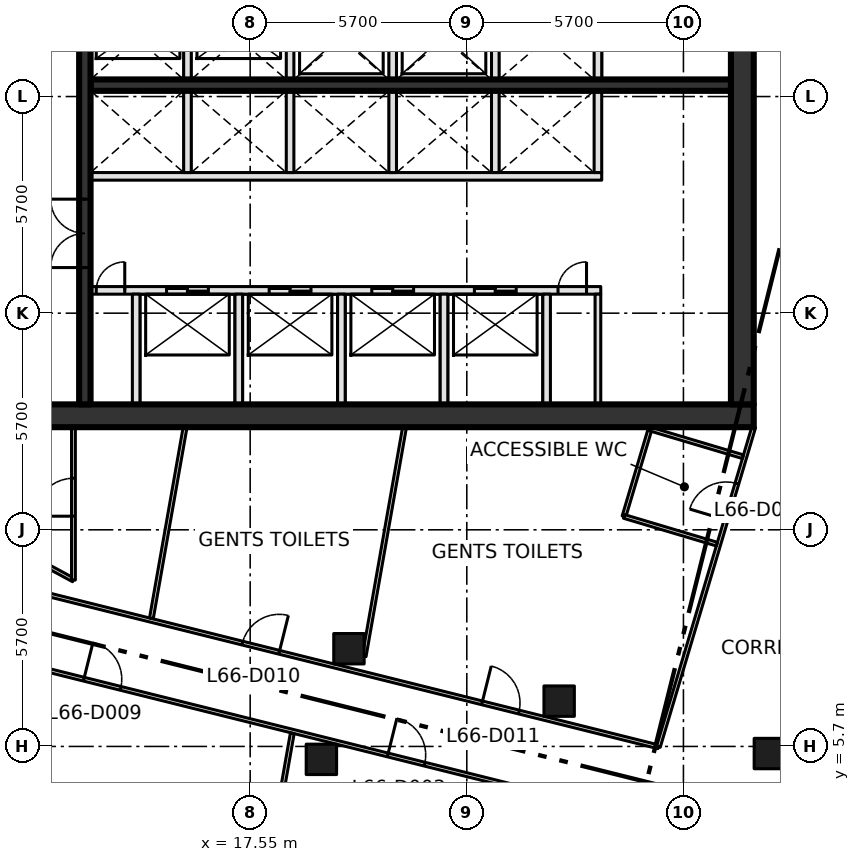
"""IFC4 building model, lengths in metres.
Left out: names, types, materials, properties, quantities, classifications, styles, units other than length and angle.
Written with IfcOpenShell. Run it as: python <this file> out.ifc"""

import sys

from ifc_helpers import new_model, si_unit, direction, frame, frame_2d, origin, origin_2d, place, context, subcontext, project, spatial, rectangle, extrude, element, fill, save


model = new_model("IFC4")
c1 = context("Model", 3, precision=1e-05, world=origin(), true_north=direction((0.0, 1.0)))
c2 = subcontext(c1, "Body", "Model", "MODEL_VIEW")
j1 = project(units=[si_unit("LENGTHUNIT", "METRE"), si_unit("PLANEANGLEUNIT", "RADIAN")], contexts=[c1])
p1 = place(None, origin())
s1 = spatial("IfcSite", under=j1, at=p1, CompositionType="ELEMENT")
p2 = place(p1, origin())
s2 = spatial("IfcBuilding", under=s1, at=p2, CompositionType="ELEMENT")
p3 = place(p2, frame((0.0, 0.0, 289.8)))
s3 = spatial("IfcBuildingStorey", under=s2, at=p3, CompositionType="ELEMENT", Elevation=289.8)
for number, where, z_axis, x_axis in (
    (1, (19.424, 5.36, 0.0), (0.0, 0.0, 1.0), (1.0, 0.0, 0.0)),
    (2, (20.149, 8.271, 0.0), (0.0, 0.0, 1.0), (1.0, 0.0, 0.0)),
    (3, (25.68, 6.892, 0.0), (0.0, 0.0, 1.0), (1.0, 0.0, 0.0)),
    (4, (31.211, 5.513, 0.0), (0.0, 0.0, 1.0), (1.0, 0.0, 0.0)),
):
    element("IfcColumn", number, at=place(p3, frame(where, z_axis=z_axis, x_axis=x_axis)), inside=s3, PredefinedType="COLUMN", context=c2, shape_type="SweptSolid", body=[
        extrude(rectangle(XDim=0.8, YDim=0.8, at=origin_2d()), origin(), (0.0, 0.0, 1.0), 4.2),
    ])
p4 = place(p3, frame((8.0, 14.4, -0.3), z_axis=(0.0, 0.0, 1.0), x_axis=(1.0, 0.0, 0.0)))
e5 = element("IfcWall", 5, at=p4, inside=s3, PredefinedType="SHEAR", context=c2, shape_type="SweptSolid", body=[
    extrude(rectangle(XDim=22.8, YDim=0.6, at=frame_2d((11.4, 0.0))), origin(), (0.0, 0.0, 1.0), 4.2),
])
p5 = place(p4, frame((2.3, 0.0, 0.3)))
e6 = element("IfcOpeningElement", 6, at=p5, cuts=e5, PredefinedType="OPENING", context=c2, shape_type="SweptSolid", body=[
    extrude(rectangle(XDim=1.8, YDim=2.1, at=frame_2d((0.9, 1.05))), frame((0.0, 0.31, 0.0), z_axis=(0.0, -1.0, 0.0), x_axis=(1.0, 0.0, 0.0)), (0.0, 0.0, 1.0), 0.62),
])
p6 = place(p3, frame((30.5, 14.7, -0.3), z_axis=(0.0, 0.0, 1.0), x_axis=(0.0, 1.0, 0.0)))
e7 = element("IfcWall", 7, at=p6, inside=s3, PredefinedType="SHEAR", context=c2, shape_type="SweptSolid", body=[
    extrude(rectangle(XDim=21.0, YDim=0.6, at=frame_2d((10.5, 0.0))), origin(), (0.0, 0.0, 1.0), 4.2),
])
p7 = place(p3, frame((13.35, 17.7, 0.0), z_axis=(0.0, 0.0, 1.0), x_axis=(1.0, 0.0, 0.0)))
e8 = element("IfcWall", 8, at=p7, inside=s3, PredefinedType="SOLIDWALL", context=c2, shape_type="SweptSolid", body=[
    extrude(rectangle(XDim=13.425, YDim=0.2, at=frame_2d((6.712, 0.0))), origin(), (0.0, 0.0, 1.0), 3.9),
])
p8 = place(p7, frame((2.0, 0.0, 0.0)))
e9 = element("IfcOpeningElement", 9, at=p8, cuts=e8, PredefinedType="OPENING", context=c2, shape_type="SweptSolid", body=[
    extrude(rectangle(XDim=1.1, YDim=2.1, at=frame_2d((0.55, 1.05))), frame((0.0, 0.11, 0.0), z_axis=(0.0, -1.0, 0.0), x_axis=(1.0, 0.0, 0.0)), (0.0, 0.0, 1.0), 0.22),
])
p9 = place(p7, frame((4.7, 0.0, 0.0)))
e10 = element("IfcOpeningElement", 10, at=p9, cuts=e8, PredefinedType="OPENING", context=c2, shape_type="SweptSolid", body=[
    extrude(rectangle(XDim=1.1, YDim=2.1, at=frame_2d((0.55, 1.05))), frame((0.0, 0.11, 0.0), z_axis=(0.0, -1.0, 0.0), x_axis=(1.0, 0.0, 0.0)), (0.0, 0.0, 1.0), 0.22),
])
p10 = place(p7, frame((7.4, 0.0, 0.0)))
e11 = element("IfcOpeningElement", 11, at=p10, cuts=e8, PredefinedType="OPENING", context=c2, shape_type="SweptSolid", body=[
    extrude(rectangle(XDim=1.1, YDim=2.1, at=frame_2d((0.55, 1.05))), frame((0.0, 0.11, 0.0), z_axis=(0.0, -1.0, 0.0), x_axis=(1.0, 0.0, 0.0)), (0.0, 0.0, 1.0), 0.22),
])
p11 = place(p7, frame((10.1, 0.0, 0.0)))
e12 = element("IfcOpeningElement", 12, at=p11, cuts=e8, PredefinedType="OPENING", context=c2, shape_type="SweptSolid", body=[
    extrude(rectangle(XDim=1.1, YDim=2.1, at=frame_2d((0.55, 1.05))), frame((0.0, 0.11, 0.0), z_axis=(0.0, -1.0, 0.0), x_axis=(1.0, 0.0, 0.0)), (0.0, 0.0, 1.0), 0.22),
])
p12 = place(p7, frame((0.15, 0.0, 0.0)))
e13 = element("IfcOpeningElement", 13, at=p12, cuts=e8, PredefinedType="OPENING", context=c2, shape_type="SweptSolid", body=[
    extrude(rectangle(XDim=0.75, YDim=2.1, at=frame_2d((0.375, 1.05))), frame((0.0, 0.11, 0.0), z_axis=(0.0, -1.0, 0.0), x_axis=(1.0, 0.0, 0.0)), (0.0, 0.0, 1.0), 0.22),
])
p13 = place(p7, frame((12.3, 0.0, 0.0)))
e14 = element("IfcOpeningElement", 14, at=p13, cuts=e8, PredefinedType="OPENING", context=c2, shape_type="SweptSolid", body=[
    extrude(rectangle(XDim=0.75, YDim=2.1, at=frame_2d((0.375, 1.05))), frame((0.0, 0.11, 0.0), z_axis=(0.0, -1.0, 0.0), x_axis=(1.0, 0.0, 0.0)), (0.0, 0.0, 1.0), 0.22),
])
p14 = place(p3, frame((13.35, 20.7, 0.0), z_axis=(0.0, 0.0, 1.0), x_axis=(1.0, 0.0, 0.0)))
e15 = element("IfcWall", 15, at=p14, inside=s3, PredefinedType="SOLIDWALL", context=c2, shape_type="SweptSolid", body=[
    extrude(rectangle(XDim=13.45, YDim=0.2, at=frame_2d((6.725, 0.0))), origin(), (0.0, 0.0, 1.0), 3.9),
])
p15 = place(p3, frame((13.35, 23.1, 0.0), z_axis=(0.0, 0.0, 1.0), x_axis=(1.0, 0.0, 0.0)))
e16 = element("IfcWall", 16, at=p15, inside=s3, PredefinedType="SHEAR", context=c2, shape_type="SweptSolid", body=[
    extrude(rectangle(XDim=16.85, YDim=0.3, at=frame_2d((8.425, 0.0))), origin(), (0.0, 0.0, 1.0), 3.9),
])
p16 = place(p3, frame((13.2, 14.7, 0.0), z_axis=(0.0, 0.0, 1.0), x_axis=(0.0, 1.0, 0.0)))
e17 = element("IfcWall", 17, at=p16, inside=s3, PredefinedType="SHEAR", context=c2, shape_type="SweptSolid", body=[
    extrude(rectangle(XDim=21.0, YDim=0.3, at=frame_2d((10.5, 0.0))), origin(), (0.0, 0.0, 1.0), 3.9),
])
p17 = place(p16, frame((3.6, 0.0, 0.0)))
e18 = element("IfcOpeningElement", 18, at=p17, cuts=e17, PredefinedType="OPENING", context=c2, shape_type="SweptSolid", body=[
    extrude(rectangle(XDim=1.8, YDim=2.1, at=frame_2d((0.9, 1.05))), frame((0.0, 0.16, 0.0), z_axis=(0.0, -1.0, 0.0), x_axis=(1.0, 0.0, 0.0)), (0.0, 0.0, 1.0), 0.32),
])
p18 = place(p16, frame((11.7, 0.0, 0.0)))
e19 = element("IfcOpeningElement", 19, at=p18, cuts=e17, PredefinedType="OPENING", context=c2, shape_type="SweptSolid", body=[
    extrude(rectangle(XDim=1.2, YDim=2.1, at=frame_2d((0.6, 1.05))), frame((0.0, 0.16, 0.0), z_axis=(0.0, -1.0, 0.0), x_axis=(1.0, 0.0, 0.0)), (0.0, 0.0, 1.0), 0.32),
])
p19 = place(p3, frame((14.55, 14.7, 0.0), z_axis=(0.0, 0.0, 1.0), x_axis=(0.0, 1.0, 0.0)))
e20 = element("IfcWall", 20, at=p19, inside=s3, PredefinedType="SOLIDWALL", context=c2, shape_type="SweptSolid", body=[
    extrude(rectangle(XDim=2.9, YDim=0.2, at=frame_2d((1.45, 0.0))), origin(), (0.0, 0.0, 1.0), 3.9),
])
p20 = place(p3, frame((15.9, 20.8, 0.0), z_axis=(0.0, 0.0, 1.0), x_axis=(0.0, 1.0, 0.0)))
e21 = element("IfcWall", 21, at=p20, inside=s3, PredefinedType="SOLIDWALL", context=c2, shape_type="SweptSolid", body=[
    extrude(rectangle(XDim=4.6, YDim=0.2, at=frame_2d((2.3, 0.0))), origin(), (0.0, 0.0, 1.0), 3.9),
])
p21 = place(p3, frame((17.25, 14.7, 0.0), z_axis=(0.0, 0.0, 1.0), x_axis=(0.0, 1.0, 0.0)))
e22 = element("IfcWall", 22, at=p21, inside=s3, PredefinedType="SOLIDWALL", context=c2, shape_type="SweptSolid", body=[
    extrude(rectangle(XDim=2.9, YDim=0.2, at=frame_2d((1.45, 0.0))), origin(), (0.0, 0.0, 1.0), 3.9),
])
p22 = place(p3, frame((18.6, 20.8, 0.0), z_axis=(0.0, 0.0, 1.0), x_axis=(0.0, 1.0, 0.0)))
e23 = element("IfcWall", 23, at=p22, inside=s3, PredefinedType="SOLIDWALL", context=c2, shape_type="SweptSolid", body=[
    extrude(rectangle(XDim=7.6, YDim=0.2, at=frame_2d((3.8, 0.0))), origin(), (0.0, 0.0, 1.0), 3.9),
])
p23 = place(p22, frame((5.6, 0.0, 0.0)))
e24 = element("IfcOpeningElement", 24, at=p23, cuts=e23, PredefinedType="OPENING", context=c2, shape_type="SweptSolid", body=[
    extrude(rectangle(XDim=1.2, YDim=2.1, at=frame_2d((0.6, 1.05))), frame((0.0, 0.11, 0.0), z_axis=(0.0, -1.0, 0.0), x_axis=(1.0, 0.0, 0.0)), (0.0, 0.0, 1.0), 0.22),
])
p24 = place(p3, frame((19.95, 14.7, 0.0), z_axis=(0.0, 0.0, 1.0), x_axis=(0.0, 1.0, 0.0)))
e25 = element("IfcWall", 25, at=p24, inside=s3, PredefinedType="SOLIDWALL", context=c2, shape_type="SweptSolid", body=[
    extrude(rectangle(XDim=2.9, YDim=0.2, at=frame_2d((1.45, 0.0))), origin(), (0.0, 0.0, 1.0), 3.9),
])
p25 = place(p3, frame((21.3, 20.8, 0.0), z_axis=(0.0, 0.0, 1.0), x_axis=(0.0, 1.0, 0.0)))
e26 = element("IfcWall", 26, at=p25, inside=s3, PredefinedType="SOLIDWALL", context=c2, shape_type="SweptSolid", body=[
    extrude(rectangle(XDim=4.6, YDim=0.2, at=frame_2d((2.3, 0.0))), origin(), (0.0, 0.0, 1.0), 3.9),
])
p26 = place(p3, frame((22.65, 14.7, 0.0), z_axis=(0.0, 0.0, 1.0), x_axis=(0.0, 1.0, 0.0)))
e27 = element("IfcWall", 27, at=p26, inside=s3, PredefinedType="SOLIDWALL", context=c2, shape_type="SweptSolid", body=[
    extrude(rectangle(XDim=2.9, YDim=0.2, at=frame_2d((1.45, 0.0))), origin(), (0.0, 0.0, 1.0), 3.9),
])
p27 = place(p3, frame((24.0, 20.8, 0.0), z_axis=(0.0, 0.0, 1.0), x_axis=(0.0, 1.0, 0.0)))
e28 = element("IfcWall", 28, at=p27, inside=s3, PredefinedType="SOLIDWALL", context=c2, shape_type="SweptSolid", body=[
    extrude(rectangle(XDim=4.6, YDim=0.2, at=frame_2d((2.3, 0.0))), origin(), (0.0, 0.0, 1.0), 3.9),
])
p28 = place(p3, frame((25.35, 14.7, 0.0), z_axis=(0.0, 0.0, 1.0), x_axis=(0.0, 1.0, 0.0)))
e29 = element("IfcWall", 29, at=p28, inside=s3, PredefinedType="SOLIDWALL", context=c2, shape_type="SweptSolid", body=[
    extrude(rectangle(XDim=2.9, YDim=0.2, at=frame_2d((1.45, 0.0))), origin(), (0.0, 0.0, 1.0), 3.9),
])
p29 = place(p3, frame((26.7, 14.7, 0.0), z_axis=(0.0, 0.0, 1.0), x_axis=(0.0, 1.0, 0.0)))
e30 = element("IfcWall", 30, at=p29, inside=s3, PredefinedType="PARTITIONING", context=c2, shape_type="SweptSolid", body=[
    extrude(rectangle(XDim=2.9, YDim=0.15, at=frame_2d((1.45, 0.0))), origin(), (0.0, 0.0, 1.0), 3.9),
])
p30 = place(p3, frame((26.7, 20.8, 0.0), z_axis=(0.0, 0.0, 1.0), x_axis=(0.0, 1.0, 0.0)))
e31 = element("IfcWall", 31, at=p30, inside=s3, PredefinedType="SOLIDWALL", context=c2, shape_type="SweptSolid", body=[
    extrude(rectangle(XDim=4.6, YDim=0.2, at=frame_2d((2.3, 0.0))), origin(), (0.0, 0.0, 1.0), 3.9),
])
p31 = place(p3, frame((8.535, 8.626, 0.0), z_axis=(0.0, 0.0, 1.0), x_axis=(0.970294986727, -0.241924861749, 0.0)))
e32 = element("IfcWall", 32, at=p31, inside=s3, PredefinedType="PARTITIONING", context=c2, shape_type="SweptSolid", body=[
    extrude(rectangle(XDim=28.501, YDim=0.1, at=frame_2d((14.25, 0.0))), origin(), (0.0, 0.0, 1.0), 3.9),
])
p32 = place(p31, frame((13.022, 0.0, 0.0)))
e33 = element("IfcOpeningElement", 33, at=p32, cuts=e32, PredefinedType="OPENING", context=c2, shape_type="SweptSolid", body=[
    extrude(rectangle(XDim=1.0, YDim=2.1, at=frame_2d((0.5, 1.05))), frame((0.0, 0.06, 0.0), z_axis=(0.0, -1.0, 0.0), x_axis=(1.0, 0.0, 0.0)), (0.0, 0.0, 1.0), 0.12),
])
p33 = place(p31, frame((20.622, 0.0, 0.0)))
e34 = element("IfcOpeningElement", 34, at=p33, cuts=e32, PredefinedType="OPENING", context=c2, shape_type="SweptSolid", body=[
    extrude(rectangle(XDim=1.0, YDim=2.1, at=frame_2d((0.5, 1.05))), frame((0.0, 0.06, 0.0), z_axis=(0.0, -1.0, 0.0), x_axis=(1.0, 0.0, 0.0)), (0.0, 0.0, 1.0), 0.12),
])
p34 = place(p31, frame((4.78, 0.0, 0.0)))
e35 = element("IfcOpeningElement", 35, at=p34, cuts=e32, PredefinedType="OPENING", context=c2, shape_type="SweptSolid", body=[
    extrude(rectangle(XDim=1.0, YDim=2.1, at=frame_2d((0.5, 1.05))), frame((0.0, 0.06, 0.0), z_axis=(0.0, -1.0, 0.0), x_axis=(1.0, 0.0, 0.0)), (0.0, 0.0, 1.0), 0.12),
])
p35 = place(p3, frame((9.002, 10.499, 0.0), z_axis=(0.0, 0.0, 1.0), x_axis=(0.970298340477, -0.241911410372, 0.0)))
e36 = element("IfcWall", 36, at=p35, inside=s3, PredefinedType="PARTITIONING", context=c2, shape_type="SweptSolid", body=[
    extrude(rectangle(XDim=19.88, YDim=0.1, at=frame_2d((9.94, 0.0))), origin(), (0.0, 0.0, 1.0), 3.9),
])
p36 = place(p35, frame((8.597, 0.0, 0.0)))
e37 = element("IfcOpeningElement", 37, at=p36, cuts=e36, PredefinedType="OPENING", context=c2, shape_type="SweptSolid", body=[
    extrude(rectangle(XDim=1.0, YDim=2.1, at=frame_2d((0.5, 1.05))), frame((0.0, 0.06, 0.0), z_axis=(0.0, -1.0, 0.0), x_axis=(1.0, 0.0, 0.0)), (0.0, 0.0, 1.0), 0.12),
])
p37 = place(p35, frame((15.098, 0.0, 0.0)))
e38 = element("IfcOpeningElement", 38, at=p37, cuts=e36, PredefinedType="OPENING", context=c2, shape_type="SweptSolid", body=[
    extrude(rectangle(XDim=1.0, YDim=2.1, at=frame_2d((0.5, 1.05))), frame((0.0, 0.06, 0.0), z_axis=(0.0, -1.0, 0.0), x_axis=(1.0, 0.0, 0.0)), (0.0, 0.0, 1.0), 0.12),
])
p38 = place(p3, frame((9.9, 11.7, 0.0), z_axis=(0.0, 0.0, 1.0), x_axis=(0.87965147249, -0.475618846291, 0.0)))
e39 = element("IfcWall", 39, at=p38, inside=s3, PredefinedType="PARTITIONING", context=c2, shape_type="SweptSolid", body=[
    extrude(rectangle(XDim=3.41, YDim=0.1, at=frame_2d((1.705, 0.0))), origin(), (0.0, 0.0, 1.0), 3.9),
])
p39 = place(p3, frame((12.9, 10.078, 0.0), z_axis=(0.0, 0.0, 1.0), x_axis=(0.0, 1.0, 0.0)))
e40 = element("IfcWall", 40, at=p39, inside=s3, PredefinedType="PARTITIONING", context=c2, shape_type="SweptSolid", body=[
    extrude(rectangle(XDim=4.022, YDim=0.1, at=frame_2d((2.011, 0.0))), origin(), (0.0, 0.0, 1.0), 3.9),
])
p40 = place(p39, frame((1.68, 0.0, 0.0)))
e41 = element("IfcOpeningElement", 41, at=p40, cuts=e40, PredefinedType="OPENING", context=c2, shape_type="SweptSolid", body=[
    extrude(rectangle(XDim=1.0, YDim=2.1, at=frame_2d((0.5, 1.05))), frame((0.0, 0.06, 0.0), z_axis=(0.0, -1.0, 0.0), x_axis=(1.0, 0.0, 0.0)), (0.0, 0.0, 1.0), 0.12),
])
p41 = place(p3, frame((28.291, 5.69, 0.0), z_axis=(0.0, 0.0, 1.0), x_axis=(0.28588265334, 0.958264633867, 0.0)))
e42 = element("IfcWall", 42, at=p41, inside=s3, PredefinedType="PARTITIONING", context=c2, shape_type="SweptSolid", body=[
    extrude(rectangle(XDim=8.776, YDim=0.1, at=frame_2d((4.388, 0.0))), origin(), (0.0, 0.0, 1.0), 3.9),
])
p42 = place(p41, frame((6.23, 0.0, 0.0)))
e43 = element("IfcOpeningElement", 43, at=p42, cuts=e42, PredefinedType="OPENING", context=c2, shape_type="SweptSolid", body=[
    extrude(rectangle(XDim=1.0, YDim=2.1, at=frame_2d((0.5, 1.05))), frame((0.0, 0.06, 0.0), z_axis=(0.0, -1.0, 0.0), x_axis=(1.0, 0.0, 0.0)), (0.0, 0.0, 1.0), 0.12),
])
p43 = place(p3, frame((14.951, 9.071, 0.0), z_axis=(0.0, 0.0, 1.0), x_axis=(0.173687149785, 0.984800880381, 0.0)))
e44 = element("IfcWall", 44, at=p43, inside=s3, PredefinedType="PARTITIONING", context=c2, shape_type="SweptSolid", body=[
    extrude(rectangle(XDim=5.107, YDim=0.1, at=frame_2d((2.553, 0.0))), origin(), (0.0, 0.0, 1.0), 3.9),
])
p44 = place(p3, frame((17.021, -3.238, 0.0), z_axis=(0.0, 0.0, 1.0), x_axis=(0.173621363154, 0.984812480758, 0.0)))
e45 = element("IfcWall", 45, at=p44, inside=s3, PredefinedType="PARTITIONING", context=c2, shape_type="SweptSolid", body=[
    extrude(rectangle(XDim=9.428, YDim=0.1, at=frame_2d((4.714, 0.0))), origin(), (0.0, 0.0, 1.0), 3.9),
])
p45 = place(p3, frame((20.549, 8.07, 0.0), z_axis=(0.0, 0.0, 1.0), x_axis=(0.173605636367, 0.984815253244, 0.0)))
e46 = element("IfcWall", 46, at=p45, inside=s3, PredefinedType="PARTITIONING", context=c2, shape_type="SweptSolid", body=[
    extrude(rectangle(XDim=6.123, YDim=0.1, at=frame_2d((3.062, 0.0))), origin(), (0.0, 0.0, 1.0), 3.9),
])
p46 = place(p3, frame((27.386, 11.752, 0.0), z_axis=(0.0, 0.0, 1.0), x_axis=(0.285826425332, 0.958281406781, 0.0)))
e47 = element("IfcWall", 47, at=p46, inside=s3, PredefinedType="PARTITIONING", context=c2, shape_type="SweptSolid", body=[
    extrude(rectangle(XDim=2.4, YDim=0.1, at=frame_2d((1.2, 0.0))), origin(), (0.0, 0.0, 1.0), 3.9),
])
for number, where, z_axis, x_axis in (
    (48, (28.072, 14.052, 0.0), (0.0, 0.0, 1.0), (0.958, -0.286, 0.0)),
    (49, (29.83, 11.023, 0.0), (0.0, 0.0, 1.0), (-0.958, 0.286, 0.0)),
):
    element("IfcWall", number, at=place(p3, frame(where, z_axis=z_axis, x_axis=x_axis)), inside=s3, PredefinedType="PARTITIONING", context=c2, shape_type="SweptSolid", body=[
        extrude(rectangle(XDim=2.551, YDim=0.1, at=frame_2d((1.275, 0.0))), origin(), (0.0, 0.0, 1.0), 3.9),
    ])
p47 = place(p8, origin())
e50 = element("IfcDoor", 50, at=p47, inside=s3, OperationType="SLIDING_TO_LEFT", PredefinedType="DOOR", context=c2, shape_type="SweptSolid", body=[
    extrude(rectangle(XDim=1.1, YDim=2.1, at=frame_2d((0.55, 1.05))), frame((0.0, 0.025, 0.0), z_axis=(0.0, -1.0, 0.0), x_axis=(1.0, 0.0, 0.0)), (0.0, 0.0, 1.0), 0.05),
])
fill(e9, e50)
p48 = place(p9, origin())
e51 = element("IfcDoor", 51, at=p48, inside=s3, OperationType="SLIDING_TO_LEFT", PredefinedType="DOOR", context=c2, shape_type="SweptSolid", body=[
    extrude(rectangle(XDim=1.1, YDim=2.1, at=frame_2d((0.55, 1.05))), frame((0.0, 0.025, 0.0), z_axis=(0.0, -1.0, 0.0), x_axis=(1.0, 0.0, 0.0)), (0.0, 0.0, 1.0), 0.05),
])
fill(e10, e51)
p49 = place(p10, origin())
e52 = element("IfcDoor", 52, at=p49, inside=s3, OperationType="SLIDING_TO_LEFT", PredefinedType="DOOR", context=c2, shape_type="SweptSolid", body=[
    extrude(rectangle(XDim=1.1, YDim=2.1, at=frame_2d((0.55, 1.05))), frame((0.0, 0.025, 0.0), z_axis=(0.0, -1.0, 0.0), x_axis=(1.0, 0.0, 0.0)), (0.0, 0.0, 1.0), 0.05),
])
fill(e11, e52)
p50 = place(p11, origin())
e53 = element("IfcDoor", 53, at=p50, inside=s3, OperationType="SLIDING_TO_LEFT", PredefinedType="DOOR", context=c2, shape_type="SweptSolid", body=[
    extrude(rectangle(XDim=1.1, YDim=2.1, at=frame_2d((0.55, 1.05))), frame((0.0, 0.025, 0.0), z_axis=(0.0, -1.0, 0.0), x_axis=(1.0, 0.0, 0.0)), (0.0, 0.0, 1.0), 0.05),
])
fill(e12, e53)
p51 = place(p12, origin())
e54 = element("IfcDoor", 54, at=p51, inside=s3, OperationType="SINGLE_SWING_RIGHT", PredefinedType="DOOR", context=c2, shape_type="SweptSolid", body=[
    extrude(rectangle(XDim=0.75, YDim=2.1, at=frame_2d((0.375, 1.05))), frame((0.0, 0.025, 0.0), z_axis=(0.0, -1.0, 0.0), x_axis=(1.0, 0.0, 0.0)), (0.0, 0.0, 1.0), 0.05),
])
fill(e13, e54)
p52 = place(p13, origin())
e55 = element("IfcDoor", 55, at=p52, inside=s3, OperationType="SINGLE_SWING_RIGHT", PredefinedType="DOOR", context=c2, shape_type="SweptSolid", body=[
    extrude(rectangle(XDim=0.75, YDim=2.1, at=frame_2d((0.375, 1.05))), frame((0.0, 0.025, 0.0), z_axis=(0.0, -1.0, 0.0), x_axis=(1.0, 0.0, 0.0)), (0.0, 0.0, 1.0), 0.05),
])
fill(e14, e55)
p53 = place(p17, origin())
e56 = element("IfcDoor", 56, at=p53, inside=s3, OperationType="DOUBLE_DOOR_SINGLE_SWING", PredefinedType="DOOR", context=c2, shape_type="SweptSolid", body=[
    extrude(rectangle(XDim=1.8, YDim=2.1, at=frame_2d((0.9, 1.05))), frame((0.0, 0.025, 0.0), z_axis=(0.0, -1.0, 0.0), x_axis=(1.0, 0.0, 0.0)), (0.0, 0.0, 1.0), 0.05),
])
fill(e18, e56)
p54 = place(p32, origin())
e57 = element("IfcDoor", 57, at=p54, inside=s3, OperationType="SINGLE_SWING_LEFT", PredefinedType="DOOR", context=c2, shape_type="SweptSolid", body=[
    extrude(rectangle(XDim=1.0, YDim=2.1, at=frame_2d((0.5, 1.05))), frame((0.0, 0.025, 0.0), z_axis=(0.0, -1.0, 0.0), x_axis=(1.0, 0.0, 0.0)), (0.0, 0.0, 1.0), 0.05),
])
fill(e33, e57)
p55 = place(p34, origin())
e58 = element("IfcDoor", 58, at=p55, inside=s3, OperationType="SINGLE_SWING_LEFT", PredefinedType="DOOR", context=c2, shape_type="SweptSolid", body=[
    extrude(rectangle(XDim=1.0, YDim=2.1, at=frame_2d((0.5, 1.05))), frame((0.0, 0.025, 0.0), z_axis=(0.0, -1.0, 0.0), x_axis=(1.0, 0.0, 0.0)), (0.0, 0.0, 1.0), 0.05),
])
fill(e35, e58)
p56 = place(p36, origin())
e59 = element("IfcDoor", 59, at=p56, inside=s3, OperationType="SINGLE_SWING_RIGHT", PredefinedType="DOOR", context=c2, shape_type="SweptSolid", body=[
    extrude(rectangle(XDim=1.0, YDim=2.1, at=frame_2d((0.5, 1.05))), frame((0.0, 0.025, 0.0), z_axis=(0.0, -1.0, 0.0), x_axis=(1.0, 0.0, 0.0)), (0.0, 0.0, 1.0), 0.05),
])
fill(e37, e59)
p57 = place(p37, origin())
e60 = element("IfcDoor", 60, at=p57, inside=s3, OperationType="SINGLE_SWING_LEFT", PredefinedType="DOOR", context=c2, shape_type="SweptSolid", body=[
    extrude(rectangle(XDim=1.0, YDim=2.1, at=frame_2d((0.5, 1.05))), frame((0.0, 0.025, 0.0), z_axis=(0.0, -1.0, 0.0), x_axis=(1.0, 0.0, 0.0)), (0.0, 0.0, 1.0), 0.05),
])
fill(e38, e60)
p58 = place(p40, origin())
e61 = element("IfcDoor", 61, at=p58, inside=s3, OperationType="SINGLE_SWING_LEFT", PredefinedType="DOOR", context=c2, shape_type="SweptSolid", body=[
    extrude(rectangle(XDim=1.0, YDim=2.1, at=frame_2d((0.5, 1.05))), frame((0.0, 0.025, 0.0), z_axis=(0.0, -1.0, 0.0), x_axis=(1.0, 0.0, 0.0)), (0.0, 0.0, 1.0), 0.05),
])
fill(e41, e61)
p59 = place(p42, origin())
e62 = element("IfcDoor", 62, at=p59, inside=s3, OperationType="SINGLE_SWING_LEFT", PredefinedType="DOOR", context=c2, shape_type="SweptSolid", body=[
    extrude(rectangle(XDim=1.0, YDim=2.1, at=frame_2d((0.5, 1.05))), frame((0.0, 0.025, 0.0), z_axis=(0.0, -1.0, 0.0), x_axis=(1.0, 0.0, 0.0)), (0.0, 0.0, 1.0), 0.05),
])
fill(e43, e62)
save(model, sys.argv[1])
